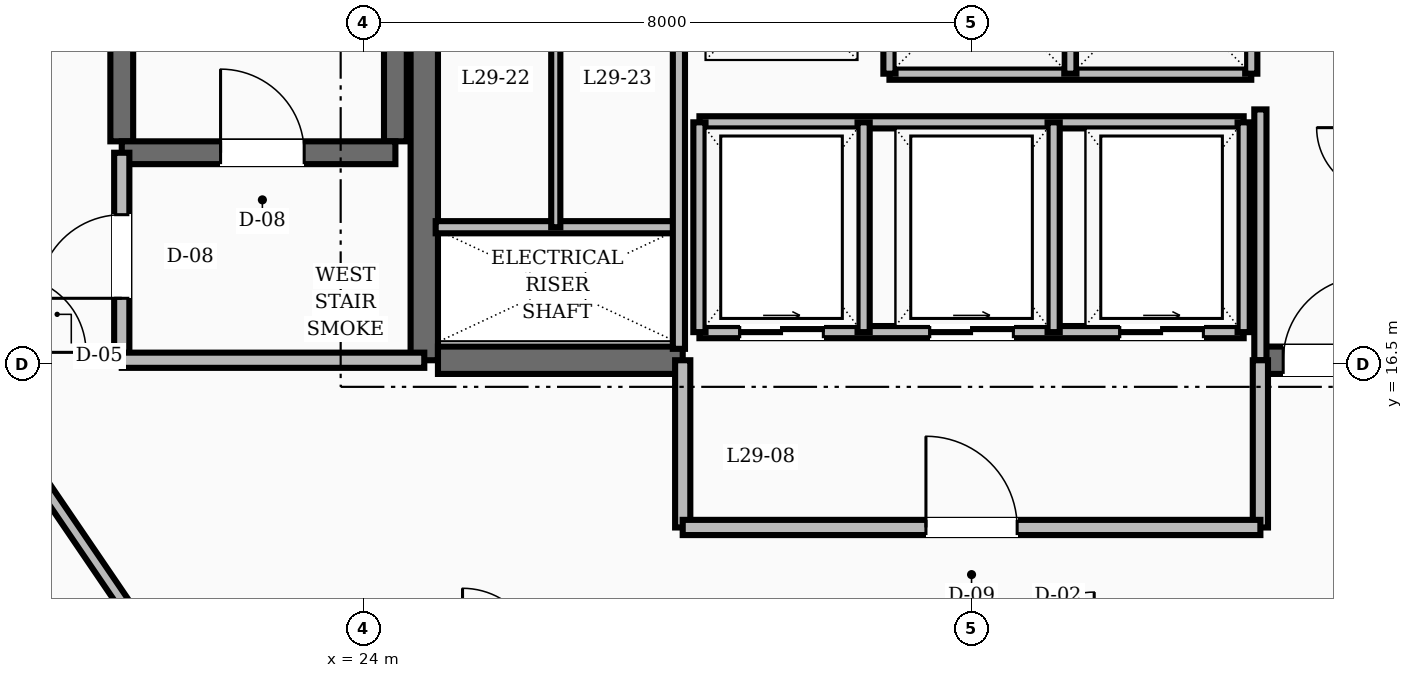
"""IFC4 building model, lengths in metres.
Left out: names, types, materials, properties, quantities, classifications, styles, units other than length and angle.
Written with IfcOpenShell. Run it as: python <this file> out.ifc"""

import sys

from ifc_helpers import new_model, si_unit, direction, frame, frame_2d, origin, place, context, subcontext, project, spatial, rectangle, extrude, element, fill, save


model = new_model("IFC4")
c1 = context("Model", 3, precision=1e-05, world=origin(), true_north=direction((0.0, 1.0)))
c2 = subcontext(c1, "Body", "Model", "MODEL_VIEW")
j1 = project(units=[si_unit("LENGTHUNIT", "METRE"), si_unit("PLANEANGLEUNIT", "RADIAN")], contexts=[c1])
p1 = place(None, origin())
s1 = spatial("IfcSite", under=j1, at=p1, CompositionType="ELEMENT")
p2 = place(p1, origin())
s2 = spatial("IfcBuilding", under=s1, at=p2, CompositionType="ELEMENT")
p3 = place(p2, frame((0.0, 0.0, 117.2)))
s3 = spatial("IfcBuildingStorey", under=s2, at=p3, CompositionType="ELEMENT", Elevation=117.2)
p4 = place(p3, frame((24.8, 16.55, 0.0), z_axis=(0.0, 0.0, 1.0), x_axis=(0.0, 1.0, 0.0)))
e1 = element("IfcWall", 1, at=p4, inside=s3, PredefinedType="SHEAR", context=c2, shape_type="SweptSolid", body=[
    extrude(rectangle(XDim=6.3, YDim=0.36, at=frame_2d((3.15, 0.0))), origin(), (0.0, 0.0, 1.0), 3.6),
])
p5 = place(p3, frame((24.98, 16.55, 0.0), z_axis=(0.0, 0.0, 1.0), x_axis=(1.0, 0.0, 0.0)))
e2 = element("IfcWall", 2, at=p5, inside=s3, PredefinedType="SHEAR", context=c2, shape_type="SweptSolid", body=[
    extrude(rectangle(XDim=3.22, YDim=0.36, at=frame_2d((1.61, 0.0))), origin(), (0.0, 0.0, 1.0), 3.6),
])
p6 = place(p3, frame((35.8, 16.55, 0.0), z_axis=(0.0, 0.0, 1.0), x_axis=(1.0, 0.0, 0.0)))
e3 = element("IfcWall", 3, at=p6, inside=s3, PredefinedType="SHEAR", context=c2, shape_type="SweptSolid", body=[
    extrude(rectangle(XDim=3.22, YDim=0.36, at=frame_2d((1.61, 0.0))), origin(), (0.0, 0.0, 1.0), 3.6),
])
p7 = place(p6, frame((0.3, 0.0, 0.0)))
e4 = element("IfcOpeningElement", 4, at=p7, cuts=e3, PredefinedType="OPENING", context=c2, shape_type="SweptSolid", body=[
    extrude(rectangle(XDim=1.1, YDim=2.1, at=frame_2d((0.55, 1.05))), frame((0.0, 0.19, 0.0), z_axis=(0.0, -1.0, 0.0), x_axis=(1.0, 0.0, 0.0)), (0.0, 0.0, 1.0), 0.38),
])
for number, where, z_axis, x_axis in (
    (5, (20.82, 19.43, 0.0), (0.0, 0.0, 1.0), (0.0, 1.0, 0.0)),
    (6, (24.42, 19.43, 0.0), (0.0, 0.0, 1.0), (0.0, 1.0, 0.0)),
):
    element("IfcWall", number, at=place(p3, frame(where, z_axis=z_axis, x_axis=x_axis)), inside=s3, PredefinedType="SHEAR", context=c2, shape_type="SweptSolid", body=[
        extrude(rectangle(XDim=8.74, YDim=0.3, at=frame_2d((4.37, 0.0))), origin(), (0.0, 0.0, 1.0), 3.6),
    ])
p8 = place(p3, frame((20.82, 19.28, 0.0), z_axis=(0.0, 0.0, 1.0), x_axis=(1.0, 0.0, 0.0)))
e7 = element("IfcWall", 7, at=p8, inside=s3, PredefinedType="SHEAR", context=c2, shape_type="SweptSolid", body=[
    extrude(rectangle(XDim=3.6, YDim=0.3, at=frame_2d((1.8, 0.0))), origin(), (0.0, 0.0, 1.0), 3.6),
])
p9 = place(p8, frame((1.3, 0.0, 0.0)))
e8 = element("IfcOpeningElement", 8, at=p9, cuts=e7, PredefinedType="OPENING", context=c2, shape_type="SweptSolid", body=[
    extrude(rectangle(XDim=1.1, YDim=2.1, at=frame_2d((0.55, 1.05))), frame((0.0, 0.16, 0.0), z_axis=(0.0, -1.0, 0.0), x_axis=(1.0, 0.0, 0.0)), (0.0, 0.0, 1.0), 0.32),
])
p10 = place(p3, frame((20.82, 16.55, 0.0), z_axis=(0.0, 0.0, 1.0), x_axis=(0.0, 1.0, 0.0)))
e9 = element("IfcWall", 9, at=p10, inside=s3, PredefinedType="SOLIDWALL", context=c2, shape_type="SweptSolid", body=[
    extrude(rectangle(XDim=2.73, YDim=0.2, at=frame_2d((1.365, 0.0))), origin(), (0.0, 0.0, 1.0), 2.8),
])
p11 = place(p10, frame((0.815, 0.0, 0.0)))
e10 = element("IfcOpeningElement", 10, at=p11, cuts=e9, PredefinedType="OPENING", context=c2, shape_type="SweptSolid", body=[
    extrude(rectangle(XDim=1.1, YDim=2.1, at=frame_2d((0.55, 1.05))), frame((0.0, 0.11, 0.0), z_axis=(0.0, -1.0, 0.0), x_axis=(1.0, 0.0, 0.0)), (0.0, 0.0, 1.0), 0.22),
])
p12 = place(p3, frame((20.82, 16.55, 0.0), z_axis=(0.0, 0.0, 1.0), x_axis=(1.0, 0.0, 0.0)))
e11 = element("IfcWall", 11, at=p12, inside=s3, PredefinedType="SOLIDWALL", context=c2, shape_type="SweptSolid", body=[
    extrude(rectangle(XDim=3.98, YDim=0.2, at=frame_2d((1.99, 0.0))), origin(), (0.0, 0.0, 1.0), 2.8),
])
p13 = place(p3, frame((35.8, 16.55, 0.0), z_axis=(0.0, 0.0, 1.0), x_axis=(0.0, 1.0, 0.0)))
e12 = element("IfcWall", 12, at=p13, inside=s3, PredefinedType="SOLIDWALL", context=c2, shape_type="SweptSolid", body=[
    extrude(rectangle(XDim=3.3, YDim=0.16, at=frame_2d((1.65, 0.0))), origin(), (0.0, 0.0, 1.0), 2.8),
])
for number, where, z_axis, x_axis in (
    (13, (28.2, 14.35, 0.0), (0.0, 0.0, 1.0), (0.0, 1.0, 0.0)),
    (14, (35.8, 14.35, 0.0), (0.0, 0.0, 1.0), (0.0, 1.0, 0.0)),
):
    element("IfcWall", number, at=place(p3, frame(where, z_axis=z_axis, x_axis=x_axis)), inside=s3, PredefinedType="SOLIDWALL", context=c2, shape_type="SweptSolid", body=[
        extrude(rectangle(XDim=2.2, YDim=0.2, at=frame_2d((1.1, 0.0))), origin(), (0.0, 0.0, 1.0), 2.8),
    ])
p14 = place(p3, frame((28.2, 14.35, 0.0), z_axis=(0.0, 0.0, 1.0), x_axis=(1.0, 0.0, 0.0)))
e15 = element("IfcWall", 15, at=p14, inside=s3, PredefinedType="SOLIDWALL", context=c2, shape_type="SweptSolid", body=[
    extrude(rectangle(XDim=7.6, YDim=0.2, at=frame_2d((3.8, 0.0))), origin(), (0.0, 0.0, 1.0), 2.8),
])
p15 = place(p14, frame((3.2, 0.0, 0.0)))
e16 = element("IfcOpeningElement", 16, at=p15, cuts=e15, PredefinedType="OPENING", context=c2, shape_type="SweptSolid", body=[
    extrude(rectangle(XDim=1.2, YDim=2.1, at=frame_2d((0.6, 1.05))), frame((0.0, 0.11, 0.0), z_axis=(0.0, -1.0, 0.0), x_axis=(1.0, 0.0, 0.0)), (0.0, 0.0, 1.0), 0.22),
])
p16 = place(p3, frame((30.92, 20.32, 0.0), z_axis=(0.0, 0.0, 1.0), x_axis=(1.0, 0.0, 0.0)))
e17 = element("IfcWall", 17, at=p16, inside=s3, PredefinedType="SOLIDWALL", context=c2, shape_type="SweptSolid", body=[
    extrude(rectangle(XDim=4.76, YDim=0.16, at=frame_2d((2.38, 0.0))), origin(), (0.0, 0.0, 1.0), 2.8),
])
for number, where, z_axis, x_axis in (
    (18, (30.92, 20.32, 0.0), (0.0, 0.0, 1.0), (0.0, 1.0, 0.0)),
    (19, (33.3, 20.32, 0.0), (0.0, 0.0, 1.0), (0.0, 1.0, 0.0)),
    (20, (35.68, 20.32, 0.0), (0.0, 0.0, 1.0), (0.0, 1.0, 0.0)),
):
    element("IfcWall", number, at=place(p3, frame(where, z_axis=z_axis, x_axis=x_axis)), inside=s3, PredefinedType="SOLIDWALL", context=c2, shape_type="SweptSolid", body=[
        extrude(rectangle(XDim=2.36, YDim=0.16, at=frame_2d((1.18, 0.0))), origin(), (0.0, 0.0, 1.0), 2.8),
    ])
p17 = place(p3, frame((28.42, 16.92, 0.0), z_axis=(0.0, 0.0, 1.0), x_axis=(1.0, 0.0, 0.0)))
e21 = element("IfcWall", 21, at=p17, inside=s3, PredefinedType="SOLIDWALL", context=c2, shape_type="SweptSolid", body=[
    extrude(rectangle(XDim=7.16, YDim=0.16, at=frame_2d((3.58, 0.0))), origin(), (0.0, 0.0, 1.0), 2.8),
])
p18 = place(p17, frame((0.53, 0.0, 0.0)))
e22 = element("IfcOpeningElement", 22, at=p18, cuts=e21, PredefinedType="OPENING", context=c2, shape_type="SweptSolid", body=[
    extrude(rectangle(XDim=1.1, YDim=2.15, at=frame_2d((0.55, 1.075))), frame((0.0, 0.09, 0.0), z_axis=(0.0, -1.0, 0.0), x_axis=(1.0, 0.0, 0.0)), (0.0, 0.0, 1.0), 0.18),
])
p19 = place(p17, frame((3.03, 0.0, 0.0)))
e23 = element("IfcOpeningElement", 23, at=p19, cuts=e21, PredefinedType="OPENING", context=c2, shape_type="SweptSolid", body=[
    extrude(rectangle(XDim=1.1, YDim=2.15, at=frame_2d((0.55, 1.075))), frame((0.0, 0.09, 0.0), z_axis=(0.0, -1.0, 0.0), x_axis=(1.0, 0.0, 0.0)), (0.0, 0.0, 1.0), 0.18),
])
p20 = place(p17, frame((5.53, 0.0, 0.0)))
e24 = element("IfcOpeningElement", 24, at=p20, cuts=e21, PredefinedType="OPENING", context=c2, shape_type="SweptSolid", body=[
    extrude(rectangle(XDim=1.1, YDim=2.15, at=frame_2d((0.55, 1.075))), frame((0.0, 0.09, 0.0), z_axis=(0.0, -1.0, 0.0), x_axis=(1.0, 0.0, 0.0)), (0.0, 0.0, 1.0), 0.18),
])
p21 = place(p3, frame((28.42, 19.68, 0.0), z_axis=(0.0, 0.0, 1.0), x_axis=(1.0, 0.0, 0.0)))
e25 = element("IfcWall", 25, at=p21, inside=s3, PredefinedType="SOLIDWALL", context=c2, shape_type="SweptSolid", body=[
    extrude(rectangle(XDim=7.16, YDim=0.16, at=frame_2d((3.58, 0.0))), origin(), (0.0, 0.0, 1.0), 2.8),
])
for number, where, z_axis, x_axis in (
    (26, (28.42, 16.92, 0.0), (0.0, 0.0, 1.0), (0.0, 1.0, 0.0)),
    (27, (30.58, 16.92, 0.0), (0.0, 0.0, 1.0), (0.0, 1.0, 0.0)),
    (28, (33.08, 16.92, 0.0), (0.0, 0.0, 1.0), (0.0, 1.0, 0.0)),
    (29, (35.58, 16.92, 0.0), (0.0, 0.0, 1.0), (0.0, 1.0, 0.0)),
):
    element("IfcWall", number, at=place(p3, frame(where, z_axis=z_axis, x_axis=x_axis)), inside=s3, PredefinedType="SOLIDWALL", context=c2, shape_type="SweptSolid", body=[
        extrude(rectangle(XDim=2.76, YDim=0.16, at=frame_2d((1.38, 0.0))), origin(), (0.0, 0.0, 1.0), 2.8),
    ])
p22 = place(p3, frame((24.95, 18.3, 0.0), z_axis=(0.0, 0.0, 1.0), x_axis=(1.0, 0.0, 0.0)))
e30 = element("IfcWall", 30, at=p22, inside=s3, PredefinedType="SOLIDWALL", context=c2, shape_type="SweptSolid", body=[
    extrude(rectangle(XDim=3.2, YDim=0.16, at=frame_2d((1.6, 0.0))), origin(), (0.0, 0.0, 1.0), 2.8),
])
p23 = place(p3, frame((28.15, 16.7, 0.0), z_axis=(0.0, 0.0, 1.0), x_axis=(0.0, 1.0, 0.0)))
e31 = element("IfcWall", 31, at=p23, inside=s3, PredefinedType="SOLIDWALL", context=c2, shape_type="SweptSolid", body=[
    extrude(rectangle(XDim=6.05, YDim=0.16, at=frame_2d((3.025, 0.0))), origin(), (0.0, 0.0, 1.0), 2.8),
])
p24 = place(p3, frame((26.53, 18.3, 0.0), z_axis=(0.0, 0.0, 1.0), x_axis=(0.0, 1.0, 0.0)))
e32 = element("IfcWall", 32, at=p24, inside=s3, PredefinedType="PARTITIONING", context=c2, shape_type="SweptSolid", body=[
    extrude(rectangle(XDim=4.45, YDim=0.12, at=frame_2d((2.225, 0.0))), origin(), (0.0, 0.0, 1.0), 2.8),
])
p25 = place(p3, frame((19.35, 15.548, 0.0), z_axis=(0.0, 0.0, 1.0), x_axis=(0.562674669208, -0.826678423955, 0.0)))
e33 = element("IfcWall", 33, at=p25, inside=s3, PredefinedType="SOLIDWALL", context=c2, shape_type="SweptSolid", body=[
    extrude(rectangle(XDim=3.021, YDim=0.16, at=frame_2d((1.511, 0.0))), origin(), (0.0, 0.0, 1.0), 2.8),
])
p26 = place(p9, origin())
e34 = element("IfcDoor", 34, at=p26, inside=s3, OperationType="SINGLE_SWING_LEFT", PredefinedType="DOOR", context=c2, shape_type="SweptSolid", body=[
    extrude(rectangle(XDim=1.1, YDim=2.1, at=frame_2d((0.55, 1.05))), frame((0.0, 0.025, 0.0), z_axis=(0.0, -1.0, 0.0), x_axis=(1.0, 0.0, 0.0)), (0.0, 0.0, 1.0), 0.05),
])
fill(e8, e34)
p27 = place(p11, origin())
e35 = element("IfcDoor", 35, at=p27, inside=s3, OperationType="SINGLE_SWING_LEFT", PredefinedType="DOOR", context=c2, shape_type="SweptSolid", body=[
    extrude(rectangle(XDim=1.1, YDim=2.1, at=frame_2d((0.55, 1.05))), frame((0.0, 0.025, 0.0), z_axis=(0.0, -1.0, 0.0), x_axis=(1.0, 0.0, 0.0)), (0.0, 0.0, 1.0), 0.05),
])
fill(e10, e35)
p28 = place(p7, origin())
e36 = element("IfcDoor", 36, at=p28, inside=s3, OperationType="SINGLE_SWING_RIGHT", PredefinedType="DOOR", context=c2, shape_type="SweptSolid", body=[
    extrude(rectangle(XDim=1.1, YDim=2.1, at=frame_2d((0.55, 1.05))), frame((0.0, 0.025, 0.0), z_axis=(0.0, -1.0, 0.0), x_axis=(1.0, 0.0, 0.0)), (0.0, 0.0, 1.0), 0.05),
])
fill(e4, e36)
p29 = place(p15, origin())
e37 = element("IfcDoor", 37, at=p29, inside=s3, OperationType="SINGLE_SWING_LEFT", PredefinedType="DOOR", context=c2, shape_type="SweptSolid", body=[
    extrude(rectangle(XDim=1.2, YDim=2.1, at=frame_2d((0.6, 1.05))), frame((0.0, 0.025, 0.0), z_axis=(0.0, -1.0, 0.0), x_axis=(1.0, 0.0, 0.0)), (0.0, 0.0, 1.0), 0.05),
])
fill(e16, e37)
p30 = place(p18, origin())
e38 = element("IfcDoor", 38, at=p30, inside=s3, OperationType="SLIDING_TO_RIGHT", PredefinedType="DOOR", context=c2, shape_type="SweptSolid", body=[
    extrude(rectangle(XDim=1.1, YDim=2.15, at=frame_2d((0.55, 1.075))), frame((0.0, 0.025, 0.0), z_axis=(0.0, -1.0, 0.0), x_axis=(1.0, 0.0, 0.0)), (0.0, 0.0, 1.0), 0.05),
])
fill(e22, e38)
p31 = place(p19, origin())
e39 = element("IfcDoor", 39, at=p31, inside=s3, OperationType="SLIDING_TO_RIGHT", PredefinedType="DOOR", context=c2, shape_type="SweptSolid", body=[
    extrude(rectangle(XDim=1.1, YDim=2.15, at=frame_2d((0.55, 1.075))), frame((0.0, 0.025, 0.0), z_axis=(0.0, -1.0, 0.0), x_axis=(1.0, 0.0, 0.0)), (0.0, 0.0, 1.0), 0.05),
])
fill(e23, e39)
p32 = place(p20, origin())
e40 = element("IfcDoor", 40, at=p32, inside=s3, OperationType="SLIDING_TO_RIGHT", PredefinedType="DOOR", context=c2, shape_type="SweptSolid", body=[
    extrude(rectangle(XDim=1.1, YDim=2.15, at=frame_2d((0.55, 1.075))), frame((0.0, 0.025, 0.0), z_axis=(0.0, -1.0, 0.0), x_axis=(1.0, 0.0, 0.0)), (0.0, 0.0, 1.0), 0.05),
])
fill(e24, e40)
save(model, sys.argv[1])
